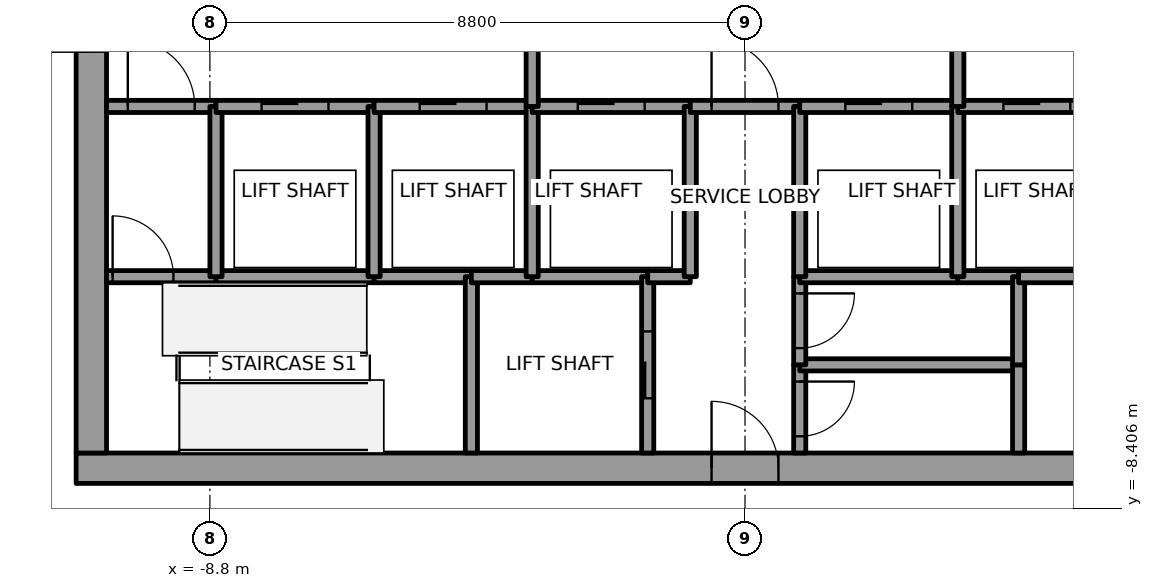
"""IFC4 building model, lengths in metres.
Left out: names, types, materials, properties, quantities, classifications, styles, units other than length and angle.
Written with IfcOpenShell. Run it as: python <this file> out.ifc"""

import sys

from ifc_helpers import new_model, si_unit, direction, frame, frame_2d, origin, place, context, subcontext, project, spatial, rectangle, extrude, element, fill, save


model = new_model("IFC4")
c1 = context("Model", 3, precision=1e-05, world=origin(), true_north=direction((0.0, 1.0)))
c2 = subcontext(c1, "Body", "Model", "MODEL_VIEW")
j1 = project(units=[si_unit("LENGTHUNIT", "METRE"), si_unit("PLANEANGLEUNIT", "RADIAN")], contexts=[c1])
p1 = place(None, origin())
s1 = spatial("IfcSite", under=j1, at=p1, CompositionType="ELEMENT")
p2 = place(p1, origin())
s2 = spatial("IfcBuilding", under=s1, at=p2, CompositionType="ELEMENT")
p3 = place(p2, frame((0.0, 0.0, 259.0)))
s3 = spatial("IfcBuildingStorey", under=s2, at=p3, CompositionType="ELEMENT", Elevation=259.0)
p4 = place(p3, frame((-11.0, -7.75, 0.0), z_axis=(0.0, 0.0, 1.0), x_axis=(1.0, 0.0, 0.0)))
e1 = element("IfcWall", 1, at=p4, inside=s3, PredefinedType="SHEAR", context=c2, shape_type="SweptSolid", body=[
    extrude(rectangle(XDim=22.0, YDim=0.5, at=frame_2d((11.0, 0.0))), origin(), (0.0, 0.0, 1.0), 4.0),
])
p5 = place(p4, frame((10.45, 0.0, 0.0)))
e2 = element("IfcOpeningElement", 2, at=p5, cuts=e1, PredefinedType="OPENING", context=c2, shape_type="SweptSolid", body=[
    extrude(rectangle(XDim=1.1, YDim=2.1, at=frame_2d((0.55, 1.05))), frame((0.0, 0.25, 0.0), z_axis=(0.0, -1.0, 0.0), x_axis=(1.0, 0.0, 0.0)), (0.0, 0.0, 1.0), 0.5),
])
p6 = place(p3, frame((-10.75, -7.5, 0.0), z_axis=(0.0, 0.0, 1.0), x_axis=(0.0, 1.0, 0.0)))
e3 = element("IfcWall", 3, at=p6, inside=s3, PredefinedType="SHEAR", context=c2, shape_type="SweptSolid", body=[
    extrude(rectangle(XDim=15.0, YDim=0.5, at=frame_2d((7.5, 0.0))), origin(), (0.0, 0.0, 1.0), 4.0),
])
p7 = place(p6, frame((6.6, 0.0, 0.0)))
e4 = element("IfcOpeningElement", 4, at=p7, cuts=e3, PredefinedType="OPENING", context=c2, shape_type="SweptSolid", body=[
    extrude(rectangle(XDim=1.8, YDim=2.1, at=frame_2d((0.9, 1.05))), frame((0.0, 0.25, 0.0), z_axis=(0.0, -1.0, 0.0), x_axis=(1.0, 0.0, 0.0)), (0.0, 0.0, 1.0), 0.5),
])
p8 = place(p3, frame((-10.5, -4.6, 0.0), z_axis=(0.0, 0.0, 1.0), x_axis=(1.0, 0.0, 0.0)))
e5 = element("IfcWall", 5, at=p8, inside=s3, PredefinedType="SOLIDWALL", context=c2, shape_type="SweptSolid", body=[
    extrude(rectangle(XDim=1.8, YDim=0.2, at=frame_2d((0.9, 0.0))), origin(), (0.0, 0.0, 1.0), 3.85),
])
p9 = place(p8, frame((0.1, 0.0, 0.0)))
e6 = element("IfcOpeningElement", 6, at=p9, cuts=e5, PredefinedType="OPENING", context=c2, shape_type="SweptSolid", body=[
    extrude(rectangle(XDim=1.0, YDim=2.1, at=frame_2d((0.5, 1.05))), frame((0.0, 0.1, 0.0), z_axis=(0.0, -1.0, 0.0), x_axis=(1.0, 0.0, 0.0)), (0.0, 0.0, 1.0), 0.2),
])
p10 = place(p3, frame((-10.5, -1.8, 0.0), z_axis=(0.0, 0.0, 1.0), x_axis=(1.0, 0.0, 0.0)))
e7 = element("IfcWall", 7, at=p10, inside=s3, PredefinedType="SOLIDWALL", context=c2, shape_type="SweptSolid", body=[
    extrude(rectangle(XDim=1.8, YDim=0.2, at=frame_2d((0.9, 0.0))), origin(), (0.0, 0.0, 1.0), 3.85),
])
p11 = place(p10, frame((0.35, 0.0, 0.0)))
e8 = element("IfcOpeningElement", 8, at=p11, cuts=e7, PredefinedType="OPENING", context=c2, shape_type="SweptSolid", body=[
    extrude(rectangle(XDim=1.1, YDim=2.1, at=frame_2d((0.55, 1.05))), frame((0.0, 0.1, 0.0), z_axis=(0.0, -1.0, 0.0), x_axis=(1.0, 0.0, 0.0)), (0.0, 0.0, 1.0), 0.2),
])
p12 = place(p3, frame((-8.7, -4.6, 0.0), z_axis=(0.0, 0.0, 1.0), x_axis=(1.0, 0.0, 0.0)))
e9 = element("IfcWall", 9, at=p12, inside=s3, PredefinedType="SOLIDWALL", context=c2, shape_type="SweptSolid", body=[
    extrude(rectangle(XDim=2.6, YDim=0.2, at=frame_2d((1.3, 0.0))), origin(), (0.0, 0.0, 1.0), 3.85),
])
p13 = place(p3, frame((-8.7, -4.6, 0.0), z_axis=(0.0, 0.0, 1.0), x_axis=(0.0, 1.0, 0.0)))
e10 = element("IfcWall", 10, at=p13, inside=s3, PredefinedType="SOLIDWALL", context=c2, shape_type="SweptSolid", body=[
    extrude(rectangle(XDim=2.8, YDim=0.2, at=frame_2d((1.4, 0.0))), origin(), (0.0, 0.0, 1.0), 3.85),
])
p14 = place(p3, frame((-8.7, -1.8, 0.0), z_axis=(0.0, 0.0, 1.0), x_axis=(1.0, 0.0, 0.0)))
e11 = element("IfcWall", 11, at=p14, inside=s3, PredefinedType="SOLIDWALL", context=c2, shape_type="SweptSolid", body=[
    extrude(rectangle(XDim=2.6, YDim=0.2, at=frame_2d((1.3, 0.0))), origin(), (0.0, 0.0, 1.0), 3.85),
])
p15 = place(p14, frame((0.75, 0.0, 0.0)))
e12 = element("IfcOpeningElement", 12, at=p15, cuts=e11, PredefinedType="OPENING", context=c2, shape_type="SweptSolid", body=[
    extrude(rectangle(XDim=1.1, YDim=2.1, at=frame_2d((0.55, 1.05))), frame((0.0, 0.1, 0.0), z_axis=(0.0, -1.0, 0.0), x_axis=(1.0, 0.0, 0.0)), (0.0, 0.0, 1.0), 0.2),
])
p16 = place(p3, frame((-6.1, -4.6, 0.0), z_axis=(0.0, 0.0, 1.0), x_axis=(1.0, 0.0, 0.0)))
e13 = element("IfcWall", 13, at=p16, inside=s3, PredefinedType="SOLIDWALL", context=c2, shape_type="SweptSolid", body=[
    extrude(rectangle(XDim=1.6, YDim=0.2, at=frame_2d((0.8, 0.0))), origin(), (0.0, 0.0, 1.0), 3.85),
])
p17 = place(p3, frame((-6.1, -4.6, 0.0), z_axis=(0.0, 0.0, 1.0), x_axis=(0.0, 1.0, 0.0)))
e14 = element("IfcWall", 14, at=p17, inside=s3, PredefinedType="SOLIDWALL", context=c2, shape_type="SweptSolid", body=[
    extrude(rectangle(XDim=2.8, YDim=0.2, at=frame_2d((1.4, 0.0))), origin(), (0.0, 0.0, 1.0), 3.85),
])
p18 = place(p3, frame((-6.1, -1.8, 0.0), z_axis=(0.0, 0.0, 1.0), x_axis=(1.0, 0.0, 0.0)))
e15 = element("IfcWall", 15, at=p18, inside=s3, PredefinedType="SOLIDWALL", context=c2, shape_type="SweptSolid", body=[
    extrude(rectangle(XDim=2.6, YDim=0.2, at=frame_2d((1.3, 0.0))), origin(), (0.0, 0.0, 1.0), 3.85),
])
p19 = place(p18, frame((0.75, 0.0, 0.0)))
e16 = element("IfcOpeningElement", 16, at=p19, cuts=e15, PredefinedType="OPENING", context=c2, shape_type="SweptSolid", body=[
    extrude(rectangle(XDim=1.1, YDim=2.1, at=frame_2d((0.55, 1.05))), frame((0.0, 0.1, 0.0), z_axis=(0.0, -1.0, 0.0), x_axis=(1.0, 0.0, 0.0)), (0.0, 0.0, 1.0), 0.2),
])
p20 = place(p3, frame((-4.5, -4.6, 0.0), z_axis=(0.0, 0.0, 1.0), x_axis=(0.0, -1.0, 0.0)))
e17 = element("IfcWall", 17, at=p20, inside=s3, PredefinedType="SOLIDWALL", context=c2, shape_type="SweptSolid", body=[
    extrude(rectangle(XDim=2.9, YDim=0.2, at=frame_2d((1.45, 0.0))), origin(), (0.0, 0.0, 1.0), 3.85),
])
p21 = place(p3, frame((-4.5, -4.6, 0.0), z_axis=(0.0, 0.0, 1.0), x_axis=(1.0, 0.0, 0.0)))
e18 = element("IfcWall", 18, at=p21, inside=s3, PredefinedType="SOLIDWALL", context=c2, shape_type="SweptSolid", body=[
    extrude(rectangle(XDim=1.0, YDim=0.2, at=frame_2d((0.5, 0.0))), origin(), (0.0, 0.0, 1.0), 3.85),
])
p22 = place(p3, frame((-3.5, -4.6, 0.0), z_axis=(0.0, 0.0, 1.0), x_axis=(1.0, 0.0, 0.0)))
e19 = element("IfcWall", 19, at=p22, inside=s3, PredefinedType="SOLIDWALL", context=c2, shape_type="SweptSolid", body=[
    extrude(rectangle(XDim=1.9, YDim=0.2, at=frame_2d((0.95, 0.0))), origin(), (0.0, 0.0, 1.0), 3.85),
])
p23 = place(p3, frame((-3.5, -4.6, 0.0), z_axis=(0.0, 0.0, 1.0), x_axis=(0.0, 1.0, 0.0)))
e20 = element("IfcWall", 20, at=p23, inside=s3, PredefinedType="SOLIDWALL", context=c2, shape_type="SweptSolid", body=[
    extrude(rectangle(XDim=2.8, YDim=0.2, at=frame_2d((1.4, 0.0))), origin(), (0.0, 0.0, 1.0), 3.85),
])
p24 = place(p3, frame((-3.5, -1.8, 0.0), z_axis=(0.0, 0.0, 1.0), x_axis=(1.0, 0.0, 0.0)))
e21 = element("IfcWall", 21, at=p24, inside=s3, PredefinedType="SOLIDWALL", context=c2, shape_type="SweptSolid", body=[
    extrude(rectangle(XDim=2.6, YDim=0.2, at=frame_2d((1.3, 0.0))), origin(), (0.0, 0.0, 1.0), 3.85),
])
p25 = place(p24, frame((0.75, 0.0, 0.0)))
e22 = element("IfcOpeningElement", 22, at=p25, cuts=e21, PredefinedType="OPENING", context=c2, shape_type="SweptSolid", body=[
    extrude(rectangle(XDim=1.1, YDim=2.1, at=frame_2d((0.55, 1.05))), frame((0.0, 0.1, 0.0), z_axis=(0.0, -1.0, 0.0), x_axis=(1.0, 0.0, 0.0)), (0.0, 0.0, 1.0), 0.2),
])
p26 = place(p3, frame((-3.5, 1.8, 0.0), z_axis=(0.0, 0.0, 1.0), x_axis=(0.0, -1.0, 0.0)))
e23 = element("IfcWall", 23, at=p26, inside=s3, PredefinedType="SOLIDWALL", context=c2, shape_type="SweptSolid", body=[
    extrude(rectangle(XDim=3.6, YDim=0.2, at=frame_2d((1.8, 0.0))), origin(), (0.0, 0.0, 1.0), 3.85),
])
p27 = place(p26, frame((1.05, 0.0, 0.0)))
e24 = element("IfcOpeningElement", 24, at=p27, cuts=e23, PredefinedType="OPENING", context=c2, shape_type="SweptSolid", body=[
    extrude(rectangle(XDim=1.5, YDim=2.1, at=frame_2d((0.75, 1.05))), frame((0.0, 0.1, 0.0), z_axis=(0.0, -1.0, 0.0), x_axis=(1.0, 0.0, 0.0)), (0.0, 0.0, 1.0), 0.2),
])
p28 = place(p3, frame((-1.6, -7.5, 0.0), z_axis=(0.0, 0.0, 1.0), x_axis=(0.0, 1.0, 0.0)))
e25 = element("IfcWall", 25, at=p28, inside=s3, PredefinedType="SOLIDWALL", context=c2, shape_type="SweptSolid", body=[
    extrude(rectangle(XDim=2.9, YDim=0.2, at=frame_2d((1.45, 0.0))), origin(), (0.0, 0.0, 1.0), 3.85),
])
p29 = place(p28, frame((0.9, 0.0, 0.0)))
e26 = element("IfcOpeningElement", 26, at=p29, cuts=e25, PredefinedType="OPENING", context=c2, shape_type="SweptSolid", body=[
    extrude(rectangle(XDim=1.1, YDim=2.1, at=frame_2d((0.55, 1.05))), frame((0.0, 0.1, 0.0), z_axis=(0.0, -1.0, 0.0), x_axis=(1.0, 0.0, 0.0)), (0.0, 0.0, 1.0), 0.2),
])
p30 = place(p3, frame((-1.6, -4.6, 0.0), z_axis=(0.0, 0.0, 1.0), x_axis=(1.0, 0.0, 0.0)))
e27 = element("IfcWall", 27, at=p30, inside=s3, PredefinedType="SOLIDWALL", context=c2, shape_type="SweptSolid", body=[
    extrude(rectangle(XDim=0.7, YDim=0.2, at=frame_2d((0.35, 0.0))), origin(), (0.0, 0.0, 1.0), 3.85),
])
p31 = place(p3, frame((-0.9, -4.6, 0.0), z_axis=(0.0, 0.0, 1.0), x_axis=(0.0, 1.0, 0.0)))
e28 = element("IfcWall", 28, at=p31, inside=s3, PredefinedType="SOLIDWALL", context=c2, shape_type="SweptSolid", body=[
    extrude(rectangle(XDim=2.8, YDim=0.2, at=frame_2d((1.4, 0.0))), origin(), (0.0, 0.0, 1.0), 3.85),
])
p32 = place(p3, frame((-0.9, -1.8, 0.0), z_axis=(0.0, 0.0, 1.0), x_axis=(1.0, 0.0, 0.0)))
e29 = element("IfcWall", 29, at=p32, inside=s3, PredefinedType="SOLIDWALL", context=c2, shape_type="SweptSolid", body=[
    extrude(rectangle(XDim=1.8, YDim=0.2, at=frame_2d((0.9, 0.0))), origin(), (0.0, 0.0, 1.0), 3.85),
])
p33 = place(p32, frame((0.35, 0.0, 0.0)))
e30 = element("IfcOpeningElement", 30, at=p33, cuts=e29, PredefinedType="OPENING", context=c2, shape_type="SweptSolid", body=[
    extrude(rectangle(XDim=1.1, YDim=2.1, at=frame_2d((0.55, 1.05))), frame((0.0, 0.1, 0.0), z_axis=(0.0, -1.0, 0.0), x_axis=(1.0, 0.0, 0.0)), (0.0, 0.0, 1.0), 0.2),
])
p34 = place(p3, frame((0.9, -6.05, 0.0), z_axis=(0.0, 0.0, 1.0), x_axis=(0.0, -1.0, 0.0)))
e31 = element("IfcWall", 31, at=p34, inside=s3, PredefinedType="SOLIDWALL", context=c2, shape_type="SweptSolid", body=[
    extrude(rectangle(XDim=1.45, YDim=0.2, at=frame_2d((0.725, 0.0))), origin(), (0.0, 0.0, 1.0), 3.85),
])
p35 = place(p34, frame((0.275, 0.0, 0.0)))
e32 = element("IfcOpeningElement", 32, at=p35, cuts=e31, PredefinedType="OPENING", context=c2, shape_type="SweptSolid", body=[
    extrude(rectangle(XDim=0.9, YDim=2.1, at=frame_2d((0.45, 1.05))), frame((0.0, 0.1, 0.0), z_axis=(0.0, -1.0, 0.0), x_axis=(1.0, 0.0, 0.0)), (0.0, 0.0, 1.0), 0.2),
])
p36 = place(p3, frame((4.5, -6.05, 0.0), z_axis=(0.0, 0.0, 1.0), x_axis=(-1.0, 0.0, 0.0)))
e33 = element("IfcWall", 33, at=p36, inside=s3, PredefinedType="SOLIDWALL", context=c2, shape_type="SweptSolid", body=[
    extrude(rectangle(XDim=3.6, YDim=0.2, at=frame_2d((1.8, 0.0))), origin(), (0.0, 0.0, 1.0), 3.85),
])
p37 = place(p3, frame((0.9, -4.6, 0.0), z_axis=(0.0, 0.0, 1.0), x_axis=(0.0, -1.0, 0.0)))
e34 = element("IfcWall", 34, at=p37, inside=s3, PredefinedType="SOLIDWALL", context=c2, shape_type="SweptSolid", body=[
    extrude(rectangle(XDim=1.45, YDim=0.2, at=frame_2d((0.725, 0.0))), origin(), (0.0, 0.0, 1.0), 3.85),
])
p38 = place(p37, frame((0.275, 0.0, 0.0)))
e35 = element("IfcOpeningElement", 35, at=p38, cuts=e34, PredefinedType="OPENING", context=c2, shape_type="SweptSolid", body=[
    extrude(rectangle(XDim=0.9, YDim=2.1, at=frame_2d((0.45, 1.05))), frame((0.0, 0.1, 0.0), z_axis=(0.0, -1.0, 0.0), x_axis=(1.0, 0.0, 0.0)), (0.0, 0.0, 1.0), 0.2),
])
p39 = place(p3, frame((3.5, -4.6, 0.0), z_axis=(0.0, 0.0, 1.0), x_axis=(-1.0, 0.0, 0.0)))
e36 = element("IfcWall", 36, at=p39, inside=s3, PredefinedType="SOLIDWALL", context=c2, shape_type="SweptSolid", body=[
    extrude(rectangle(XDim=2.6, YDim=0.2, at=frame_2d((1.3, 0.0))), origin(), (0.0, 0.0, 1.0), 3.85),
])
p40 = place(p3, frame((0.9, -1.8, 0.0), z_axis=(0.0, 0.0, 1.0), x_axis=(0.0, -1.0, 0.0)))
e37 = element("IfcWall", 37, at=p40, inside=s3, PredefinedType="SOLIDWALL", context=c2, shape_type="SweptSolid", body=[
    extrude(rectangle(XDim=2.8, YDim=0.2, at=frame_2d((1.4, 0.0))), origin(), (0.0, 0.0, 1.0), 3.85),
])
p41 = place(p3, frame((0.9, -1.8, 0.0), z_axis=(0.0, 0.0, 1.0), x_axis=(1.0, 0.0, 0.0)))
e38 = element("IfcWall", 38, at=p41, inside=s3, PredefinedType="SOLIDWALL", context=c2, shape_type="SweptSolid", body=[
    extrude(rectangle(XDim=2.6, YDim=0.2, at=frame_2d((1.3, 0.0))), origin(), (0.0, 0.0, 1.0), 3.85),
])
p42 = place(p41, frame((0.75, 0.0, 0.0)))
e39 = element("IfcOpeningElement", 39, at=p42, cuts=e38, PredefinedType="OPENING", context=c2, shape_type="SweptSolid", body=[
    extrude(rectangle(XDim=1.1, YDim=2.1, at=frame_2d((0.55, 1.05))), frame((0.0, 0.1, 0.0), z_axis=(0.0, -1.0, 0.0), x_axis=(1.0, 0.0, 0.0)), (0.0, 0.0, 1.0), 0.2),
])
p43 = place(p3, frame((4.5, -4.6, 0.0), z_axis=(0.0, 0.0, 1.0), x_axis=(-1.0, 0.0, 0.0)))
e40 = element("IfcWall", 40, at=p43, inside=s3, PredefinedType="SOLIDWALL", context=c2, shape_type="SweptSolid", body=[
    extrude(rectangle(XDim=1.0, YDim=0.2, at=frame_2d((0.5, 0.0))), origin(), (0.0, 0.0, 1.0), 3.85),
])
p44 = place(p3, frame((3.5, -4.6, 0.0), z_axis=(0.0, 0.0, 1.0), x_axis=(0.0, 1.0, 0.0)))
e41 = element("IfcWall", 41, at=p44, inside=s3, PredefinedType="SOLIDWALL", context=c2, shape_type="SweptSolid", body=[
    extrude(rectangle(XDim=2.8, YDim=0.2, at=frame_2d((1.4, 0.0))), origin(), (0.0, 0.0, 1.0), 3.85),
])
p45 = place(p3, frame((3.5, -1.8, 0.0), z_axis=(0.0, 0.0, 1.0), x_axis=(1.0, 0.0, 0.0)))
e42 = element("IfcWall", 42, at=p45, inside=s3, PredefinedType="SOLIDWALL", context=c2, shape_type="SweptSolid", body=[
    extrude(rectangle(XDim=2.6, YDim=0.2, at=frame_2d((1.3, 0.0))), origin(), (0.0, 0.0, 1.0), 3.85),
])
p46 = place(p45, frame((0.75, 0.0, 0.0)))
e43 = element("IfcOpeningElement", 43, at=p46, cuts=e42, PredefinedType="OPENING", context=c2, shape_type="SweptSolid", body=[
    extrude(rectangle(XDim=1.1, YDim=2.1, at=frame_2d((0.55, 1.05))), frame((0.0, 0.1, 0.0), z_axis=(0.0, -1.0, 0.0), x_axis=(1.0, 0.0, 0.0)), (0.0, 0.0, 1.0), 0.2),
])
p47 = place(p3, frame((3.5, -1.8, 0.0), z_axis=(0.0, 0.0, 1.0), x_axis=(0.0, 1.0, 0.0)))
e44 = element("IfcWall", 44, at=p47, inside=s3, PredefinedType="SOLIDWALL", context=c2, shape_type="SweptSolid", body=[
    extrude(rectangle(XDim=3.6, YDim=0.2, at=frame_2d((1.8, 0.0))), origin(), (0.0, 0.0, 1.0), 3.85),
])
p48 = place(p47, frame((1.05, 0.0, 0.0)))
e45 = element("IfcOpeningElement", 45, at=p48, cuts=e44, PredefinedType="OPENING", context=c2, shape_type="SweptSolid", body=[
    extrude(rectangle(XDim=1.5, YDim=2.1, at=frame_2d((0.75, 1.05))), frame((0.0, 0.1, 0.0), z_axis=(0.0, -1.0, 0.0), x_axis=(1.0, 0.0, 0.0)), (0.0, 0.0, 1.0), 0.2),
])
for number, where, z_axis, x_axis in (
    (46, (4.5, -6.05, 0.0), (0.0, 0.0, 1.0), (0.0, -1.0, 0.0)),
    (47, (4.5, -4.6, 0.0), (0.0, 0.0, 1.0), (0.0, -1.0, 0.0)),
):
    element("IfcWall", number, at=place(p3, frame(where, z_axis=z_axis, x_axis=x_axis)), inside=s3, PredefinedType="SOLIDWALL", context=c2, shape_type="SweptSolid", body=[
        extrude(rectangle(XDim=1.45, YDim=0.2, at=frame_2d((0.725, 0.0))), origin(), (0.0, 0.0, 1.0), 3.85),
    ])
p49 = place(p3, frame((6.1, -4.6, 0.0), z_axis=(0.0, 0.0, 1.0), x_axis=(-1.0, 0.0, 0.0)))
e48 = element("IfcWall", 48, at=p49, inside=s3, PredefinedType="SOLIDWALL", context=c2, shape_type="SweptSolid", body=[
    extrude(rectangle(XDim=1.6, YDim=0.2, at=frame_2d((0.8, 0.0))), origin(), (0.0, 0.0, 1.0), 3.85),
])
p50 = place(p15, origin())
e49 = element("IfcDoor", 49, at=p50, inside=s3, OperationType="SLIDING_TO_LEFT", PredefinedType="DOOR", context=c2, shape_type="SweptSolid", body=[
    extrude(rectangle(XDim=1.1, YDim=2.1, at=frame_2d((0.55, 1.05))), frame((0.0, 0.025, 0.0), z_axis=(0.0, -1.0, 0.0), x_axis=(1.0, 0.0, 0.0)), (0.0, 0.0, 1.0), 0.05),
])
fill(e12, e49)
p51 = place(p19, origin())
e50 = element("IfcDoor", 50, at=p51, inside=s3, OperationType="SLIDING_TO_LEFT", PredefinedType="DOOR", context=c2, shape_type="SweptSolid", body=[
    extrude(rectangle(XDim=1.1, YDim=2.1, at=frame_2d((0.55, 1.05))), frame((0.0, 0.025, 0.0), z_axis=(0.0, -1.0, 0.0), x_axis=(1.0, 0.0, 0.0)), (0.0, 0.0, 1.0), 0.05),
])
fill(e16, e50)
p52 = place(p25, origin())
e51 = element("IfcDoor", 51, at=p52, inside=s3, OperationType="SLIDING_TO_RIGHT", PredefinedType="DOOR", context=c2, shape_type="SweptSolid", body=[
    extrude(rectangle(XDim=1.1, YDim=2.1, at=frame_2d((0.55, 1.05))), frame((0.0, 0.025, 0.0), z_axis=(0.0, -1.0, 0.0), x_axis=(1.0, 0.0, 0.0)), (0.0, 0.0, 1.0), 0.05),
])
fill(e22, e51)
p53 = place(p42, origin())
e52 = element("IfcDoor", 52, at=p53, inside=s3, OperationType="SLIDING_TO_RIGHT", PredefinedType="DOOR", context=c2, shape_type="SweptSolid", body=[
    extrude(rectangle(XDim=1.1, YDim=2.1, at=frame_2d((0.55, 1.05))), frame((0.0, 0.025, 0.0), z_axis=(0.0, -1.0, 0.0), x_axis=(1.0, 0.0, 0.0)), (0.0, 0.0, 1.0), 0.05),
])
fill(e39, e52)
p54 = place(p46, origin())
e53 = element("IfcDoor", 53, at=p54, inside=s3, OperationType="SLIDING_TO_LEFT", PredefinedType="DOOR", context=c2, shape_type="SweptSolid", body=[
    extrude(rectangle(XDim=1.1, YDim=2.1, at=frame_2d((0.55, 1.05))), frame((0.0, 0.025, 0.0), z_axis=(0.0, -1.0, 0.0), x_axis=(1.0, 0.0, 0.0)), (0.0, 0.0, 1.0), 0.05),
])
fill(e43, e53)
p55 = place(p29, origin())
e54 = element("IfcDoor", 54, at=p55, inside=s3, OperationType="SLIDING_TO_LEFT", PredefinedType="DOOR", context=c2, shape_type="SweptSolid", body=[
    extrude(rectangle(XDim=1.1, YDim=2.1, at=frame_2d((0.55, 1.05))), frame((0.0, 0.025, 0.0), z_axis=(0.0, -1.0, 0.0), x_axis=(1.0, 0.0, 0.0)), (0.0, 0.0, 1.0), 0.05),
])
fill(e26, e54)
p56 = place(p11, origin())
e55 = element("IfcDoor", 55, at=p56, inside=s3, OperationType="SINGLE_SWING_LEFT", PredefinedType="DOOR", context=c2, shape_type="SweptSolid", body=[
    extrude(rectangle(XDim=1.1, YDim=2.1, at=frame_2d((0.55, 1.05))), frame((0.0, 0.025, 0.0), z_axis=(0.0, -1.0, 0.0), x_axis=(1.0, 0.0, 0.0)), (0.0, 0.0, 1.0), 0.05),
])
fill(e8, e55)
p57 = place(p33, origin())
e56 = element("IfcDoor", 56, at=p57, inside=s3, OperationType="SINGLE_SWING_RIGHT", PredefinedType="DOOR", context=c2, shape_type="SweptSolid", body=[
    extrude(rectangle(XDim=1.1, YDim=2.1, at=frame_2d((0.55, 1.05))), frame((0.0, 0.025, 0.0), z_axis=(0.0, -1.0, 0.0), x_axis=(1.0, 0.0, 0.0)), (0.0, 0.0, 1.0), 0.05),
])
fill(e30, e56)
p58 = place(p9, origin())
e57 = element("IfcDoor", 57, at=p58, inside=s3, OperationType="SINGLE_SWING_LEFT", PredefinedType="DOOR", context=c2, shape_type="SweptSolid", body=[
    extrude(rectangle(XDim=1.0, YDim=2.1, at=frame_2d((0.5, 1.05))), frame((0.0, 0.025, 0.0), z_axis=(0.0, -1.0, 0.0), x_axis=(1.0, 0.0, 0.0)), (0.0, 0.0, 1.0), 0.05),
])
fill(e6, e57)
p59 = place(p35, origin())
e58 = element("IfcDoor", 58, at=p59, inside=s3, OperationType="SINGLE_SWING_LEFT", PredefinedType="DOOR", context=c2, shape_type="SweptSolid", body=[
    extrude(rectangle(XDim=0.9, YDim=2.1, at=frame_2d((0.45, 1.05))), frame((0.0, 0.025, 0.0), z_axis=(0.0, -1.0, 0.0), x_axis=(1.0, 0.0, 0.0)), (0.0, 0.0, 1.0), 0.05),
])
fill(e32, e58)
p60 = place(p38, origin())
e59 = element("IfcDoor", 59, at=p60, inside=s3, OperationType="SINGLE_SWING_RIGHT", PredefinedType="DOOR", context=c2, shape_type="SweptSolid", body=[
    extrude(rectangle(XDim=0.9, YDim=2.1, at=frame_2d((0.45, 1.05))), frame((0.0, 0.025, 0.0), z_axis=(0.0, -1.0, 0.0), x_axis=(1.0, 0.0, 0.0)), (0.0, 0.0, 1.0), 0.05),
])
fill(e35, e59)
p61 = place(p7, origin())
e60 = element("IfcDoor", 60, at=p61, inside=s3, OperationType="DOUBLE_DOOR_SINGLE_SWING", PredefinedType="DOOR", context=c2, shape_type="SweptSolid", body=[
    extrude(rectangle(XDim=1.8, YDim=2.1, at=frame_2d((0.9, 1.05))), frame((0.0, 0.025, 0.0), z_axis=(0.0, -1.0, 0.0), x_axis=(1.0, 0.0, 0.0)), (0.0, 0.0, 1.0), 0.05),
])
fill(e4, e60)
p62 = place(p5, origin())
e61 = element("IfcDoor", 61, at=p62, inside=s3, OperationType="SINGLE_SWING_RIGHT", PredefinedType="DOOR", context=c2, shape_type="SweptSolid", body=[
    extrude(rectangle(XDim=1.1, YDim=2.1, at=frame_2d((0.55, 1.05))), frame((0.0, 0.025, 0.0), z_axis=(0.0, -1.0, 0.0), x_axis=(1.0, 0.0, 0.0)), (0.0, 0.0, 1.0), 0.05),
])
fill(e2, e61)
save(model, sys.argv[1])
